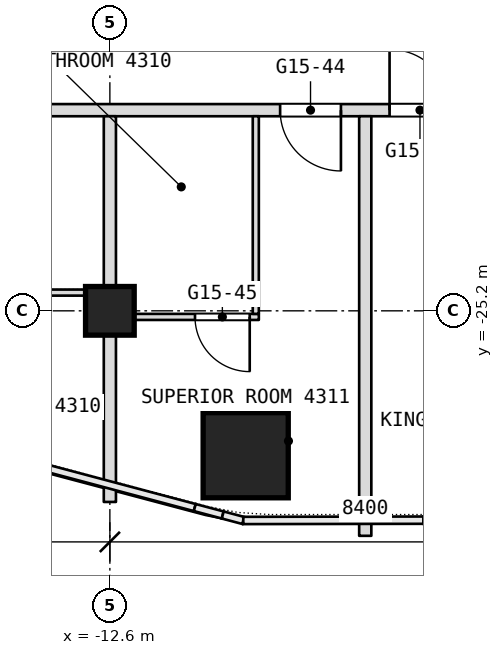
"""IFC4 building model, lengths in metres.
Left out: names, types, materials, properties, quantities, classifications, styles, units other than length and angle.
Written with IfcOpenShell. Run it as: python <this file> out.ifc"""

import sys

from ifc_helpers import new_model, si_unit, direction, frame, frame_2d, origin, origin_2d, place, context, subcontext, project, spatial, rectangle, extrude, element, fill, save


model = new_model("IFC4")
c1 = context("Model", 3, precision=1e-05, world=origin(), true_north=direction((0.0, 1.0)))
c2 = subcontext(c1, "Body", "Model", "MODEL_VIEW")
j1 = project(units=[si_unit("LENGTHUNIT", "METRE"), si_unit("PLANEANGLEUNIT", "RADIAN")], contexts=[c1])
p1 = place(None, origin())
s1 = spatial("IfcSite", under=j1, at=p1, CompositionType="ELEMENT")
p2 = place(p1, origin())
s2 = spatial("IfcBuilding", under=s1, at=p2, CompositionType="ELEMENT")
p3 = place(p2, frame((0.0, 0.0, 191.3)))
s3 = spatial("IfcBuildingStorey", under=s2, at=p3, CompositionType="ELEMENT", Elevation=191.3)
p4 = place(p3, frame((-10.366, -27.575, 0.0), z_axis=(0.0, 0.0, 1.0), x_axis=(1.0, 0.0, 0.0)))
e1 = element("IfcColumn", 1, at=p4, inside=s3, PredefinedType="COLUMN", context=c2, shape_type="SweptSolid", body=[
    extrude(rectangle(XDim=1.4, YDim=1.4, at=origin_2d()), origin(), (0.0, 0.0, 1.0), 3.6),
])
p5 = place(p3, frame((-12.6, -25.2, 0.0), z_axis=(0.0, 0.0, 1.0), x_axis=(1.0, 0.0, 0.0)))
e2 = element("IfcColumn", 2, at=p5, inside=s3, PredefinedType="COLUMN", context=c2, shape_type="SweptSolid", body=[
    extrude(rectangle(XDim=0.8, YDim=0.8, at=origin_2d()), origin(), (0.0, 0.0, 1.0), 3.6),
])
p6 = place(p3, frame((-12.5, -25.3, 0.0), z_axis=(0.0, 0.0, 1.0), x_axis=(1.0, 0.0, 0.0)))
e3 = element("IfcWall", 3, at=p6, inside=s3, PredefinedType="PARTITIONING", context=c2, shape_type="SweptSolid", body=[
    extrude(rectangle(XDim=2.35, YDim=0.1, at=frame_2d((1.175, 0.0))), origin(), (0.0, 0.0, 1.0), 2.94),
])
p7 = place(p6, frame((1.3, 0.0, 0.0)))
e4 = element("IfcOpeningElement", 4, at=p7, cuts=e3, PredefinedType="OPENING", context=c2, shape_type="SweptSolid", body=[
    extrude(rectangle(XDim=0.9, YDim=2.1, at=frame_2d((0.45, 1.05))), frame((0.0, 0.05, 0.0), z_axis=(0.0, -1.0, 0.0), x_axis=(1.0, 0.0, 0.0)), (0.0, 0.0, 1.0), 0.1),
])
p8 = place(p3, frame((-14.95, -24.9, 0.0), z_axis=(0.0, 0.0, 1.0), x_axis=(1.0, 0.0, 0.0)))
e5 = element("IfcWall", 5, at=p8, inside=s3, PredefinedType="PARTITIONING", context=c2, shape_type="SweptSolid", body=[
    extrude(rectangle(XDim=2.45, YDim=0.1, at=frame_2d((1.225, 0.0))), origin(), (0.0, 0.0, 1.0), 3.34),
])
p9 = place(p8, frame((0.15, 0.0, 0.0)))
e6 = element("IfcOpeningElement", 6, at=p9, cuts=e5, PredefinedType="OPENING", context=c2, shape_type="SweptSolid", body=[
    extrude(rectangle(XDim=0.9, YDim=2.1, at=frame_2d((0.45, 1.05))), frame((0.0, 0.05, 0.0), z_axis=(0.0, -1.0, 0.0), x_axis=(1.0, 0.0, 0.0)), (0.0, 0.0, 1.0), 0.1),
])
p10 = place(p3, frame((-16.7, -21.9, 0.0), z_axis=(0.0, 0.0, 1.0), x_axis=(1.0, 0.0, 0.0)))
e7 = element("IfcWall", 7, at=p10, inside=s3, PredefinedType="PARTITIONING", context=c2, shape_type="SweptSolid", body=[
    extrude(rectangle(XDim=33.4, YDim=0.2, at=frame_2d((16.7, 0.0))), origin(), (0.0, 0.0, 1.0), 3.34),
])
p11 = place(p10, frame((0.3, 0.0, 0.0)))
e8 = element("IfcOpeningElement", 8, at=p11, cuts=e7, PredefinedType="OPENING", context=c2, shape_type="SweptSolid", body=[
    extrude(rectangle(XDim=1.0, YDim=2.1, at=frame_2d((0.5, 1.05))), frame((0.0, 0.1, 0.0), z_axis=(0.0, -1.0, 0.0), x_axis=(1.0, 0.0, 0.0)), (0.0, 0.0, 1.0), 0.2),
])
p12 = place(p10, frame((6.9, 0.0, 0.0)))
e9 = element("IfcOpeningElement", 9, at=p12, cuts=e7, PredefinedType="OPENING", context=c2, shape_type="SweptSolid", body=[
    extrude(rectangle(XDim=1.0, YDim=2.1, at=frame_2d((0.5, 1.05))), frame((0.0, 0.1, 0.0), z_axis=(0.0, -1.0, 0.0), x_axis=(1.0, 0.0, 0.0)), (0.0, 0.0, 1.0), 0.2),
])
p13 = place(p10, frame((8.7, 0.0, 0.0)))
e10 = element("IfcOpeningElement", 10, at=p13, cuts=e7, PredefinedType="OPENING", context=c2, shape_type="SweptSolid", body=[
    extrude(rectangle(XDim=1.0, YDim=2.1, at=frame_2d((0.5, 1.05))), frame((0.0, 0.1, 0.0), z_axis=(0.0, -1.0, 0.0), x_axis=(1.0, 0.0, 0.0)), (0.0, 0.0, 1.0), 0.2),
])
p14 = place(p10, frame((15.8, 0.0, 0.0)))
e11 = element("IfcOpeningElement", 11, at=p14, cuts=e7, PredefinedType="OPENING", context=c2, shape_type="SweptSolid", body=[
    extrude(rectangle(XDim=1.8, YDim=2.1, at=frame_2d((0.9, 1.05))), frame((0.0, 0.1, 0.0), z_axis=(0.0, -1.0, 0.0), x_axis=(1.0, 0.0, 0.0)), (0.0, 0.0, 1.0), 0.2),
])
p15 = place(p10, frame((26.65, 0.0, 0.0)))
e12 = element("IfcOpeningElement", 12, at=p15, cuts=e7, PredefinedType="OPENING", context=c2, shape_type="SweptSolid", body=[
    extrude(rectangle(XDim=1.1, YDim=2.1, at=frame_2d((0.55, 1.05))), frame((0.0, 0.1, 0.0), z_axis=(0.0, -1.0, 0.0), x_axis=(1.0, 0.0, 0.0)), (0.0, 0.0, 1.0), 0.2),
])
p16 = place(p10, frame((29.7, 0.0, 0.0)))
e13 = element("IfcOpeningElement", 13, at=p16, cuts=e7, PredefinedType="OPENING", context=c2, shape_type="SweptSolid", body=[
    extrude(rectangle(XDim=1.0, YDim=2.1, at=frame_2d((0.5, 1.05))), frame((0.0, 0.1, 0.0), z_axis=(0.0, -1.0, 0.0), x_axis=(1.0, 0.0, 0.0)), (0.0, 0.0, 1.0), 0.2),
])
p17 = place(p3, frame((-8.4, -28.9, 0.0), z_axis=(0.0, 0.0, 1.0), x_axis=(0.0, 1.0, 0.0)))
e14 = element("IfcWall", 14, at=p17, inside=s3, PredefinedType="PARTITIONING", context=c2, shape_type="SweptSolid", body=[
    extrude(rectangle(XDim=6.9, YDim=0.2, at=frame_2d((3.45, 0.0))), origin(), (0.0, 0.0, 1.0), 3.34),
])
p18 = place(p3, frame((-10.2, -25.25, 0.0), z_axis=(0.0, 0.0, 1.0), x_axis=(0.0, 1.0, 0.0)))
e15 = element("IfcWall", 15, at=p18, inside=s3, PredefinedType="PARTITIONING", context=c2, shape_type="SweptSolid", body=[
    extrude(rectangle(XDim=3.25, YDim=0.1, at=frame_2d((1.625, 0.0))), origin(), (0.0, 0.0, 1.0), 3.34),
])
p19 = place(p3, frame((-12.6, -28.343, 0.0), z_axis=(0.0, 0.0, 1.0), x_axis=(0.0, 1.0, 0.0)))
e16 = element("IfcWall", 16, at=p19, inside=s3, PredefinedType="PARTITIONING", context=c2, shape_type="SweptSolid", body=[
    extrude(rectangle(XDim=6.343, YDim=0.2, at=frame_2d((3.171, 0.0))), origin(), (0.0, 0.0, 1.0), 3.34),
])
p20 = place(p7, origin())
e17 = element("IfcDoor", 17, at=p20, inside=s3, OperationType="SINGLE_SWING_RIGHT", PredefinedType="DOOR", context=c2, shape_type="SweptSolid", body=[
    extrude(rectangle(XDim=0.9, YDim=2.1, at=frame_2d((0.45, 1.05))), frame((0.0, 0.025, 0.0), z_axis=(0.0, -1.0, 0.0), x_axis=(1.0, 0.0, 0.0)), (0.0, 0.0, 1.0), 0.05),
])
fill(e4, e17)
p21 = place(p12, origin())
e18 = element("IfcDoor", 18, at=p21, inside=s3, OperationType="SINGLE_SWING_RIGHT", PredefinedType="DOOR", context=c2, shape_type="SweptSolid", body=[
    extrude(rectangle(XDim=1.0, YDim=2.1, at=frame_2d((0.5, 1.05))), frame((0.0, 0.025, 0.0), z_axis=(0.0, -1.0, 0.0), x_axis=(1.0, 0.0, 0.0)), (0.0, 0.0, 1.0), 0.05),
])
fill(e9, e18)
p22 = place(p13, origin())
e19 = element("IfcDoor", 19, at=p22, inside=s3, OperationType="SINGLE_SWING_RIGHT", PredefinedType="DOOR", context=c2, shape_type="SweptSolid", body=[
    extrude(rectangle(XDim=1.0, YDim=2.1, at=frame_2d((0.5, 1.05))), frame((0.0, 0.025, 0.0), z_axis=(0.0, -1.0, 0.0), x_axis=(1.0, 0.0, 0.0)), (0.0, 0.0, 1.0), 0.05),
])
fill(e10, e19)
save(model, sys.argv[1])
